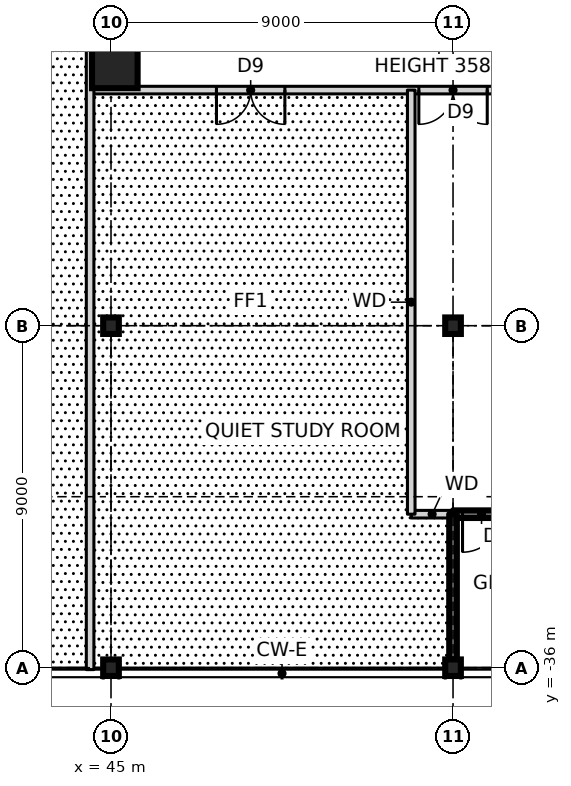
"""IFC4 building model, lengths in metres.
Left out: names, types, materials, properties, quantities, classifications, styles, units other than length and angle.
Written with IfcOpenShell. Run it as: python <this file> out.ifc"""

import sys

from ifc_helpers import new_model, si_unit, direction, frame, frame_2d, origin, origin_2d, place, context, subcontext, project, spatial, rectangle, hollow_rectangle, i_section, extrude, element, fill, save


model = new_model("IFC4")
c1 = context("Model", 3, precision=1e-05, world=origin(), true_north=direction((0.0, 1.0)))
c2 = subcontext(c1, "Body", "Model", "MODEL_VIEW")
j1 = project(units=[si_unit("LENGTHUNIT", "METRE"), si_unit("PLANEANGLEUNIT", "RADIAN")], contexts=[c1])
p1 = place(None, origin())
s1 = spatial("IfcSite", under=j1, at=p1, CompositionType="ELEMENT")
p2 = place(p1, origin())
s2 = spatial("IfcBuilding", under=s1, at=p2, CompositionType="ELEMENT")
p3 = place(p2, frame((0.0, 0.0, 10.5)))
s3 = spatial("IfcBuildingStorey", under=s2, at=p3, CompositionType="ELEMENT", Elevation=10.5)
p4 = place(p3, frame((45.1, -20.15, 0.0), z_axis=(0.0, 0.0, 1.0), x_axis=(1.0, 0.0, 0.0)))
e1 = element("IfcColumn", 1, at=p4, inside=s3, PredefinedType="COLUMN", context=c2, shape_type="SweptSolid", body=[
    extrude(hollow_rectangle(XDim=1.2, YDim=1.2, WallThickness=0.07, at=origin_2d()), origin(), (0.0, 0.0, 1.0), 4.5),
])
for number, where, z_axis, x_axis in (
    (2, (45.0, -36.0, 0.0), (0.0, 0.0, 1.0), (1.0, 0.0, 0.0)),
    (3, (45.0, -27.0, 0.0), (0.0, 0.0, 1.0), (1.0, 0.0, 0.0)),
    (4, (54.0, -36.0, 0.0), (0.0, 0.0, 1.0), (1.0, 0.0, 0.0)),
    (5, (54.0, -27.0, 0.0), (0.0, 0.0, 1.0), (1.0, 0.0, 0.0)),
):
    element("IfcColumn", number, at=place(p3, frame(where, z_axis=z_axis, x_axis=x_axis)), inside=s3, PredefinedType="COLUMN", context=c2, shape_type="SweptSolid", body=[
        extrude(i_section(OverallWidth=0.411, OverallDepth=0.434, WebThickness=0.036, FlangeThickness=0.057, at=origin_2d()), origin(), (0.0, 0.0, 1.0), 4.5),
    ])
p5 = place(p3, frame((52.9, -31.96, 0.0), z_axis=(0.0, 0.0, 1.0), x_axis=(1.0, 0.0, 0.0)))
e6 = element("IfcWall", 6, at=p5, inside=s3, PredefinedType="SOLIDWALL", context=c2, shape_type="SweptSolid", body=[
    extrude(rectangle(XDim=1.1, YDim=0.2, at=frame_2d((0.55, 0.0))), origin(), (0.0, 0.0, 1.0), 4.25),
])
p6 = place(p3, frame((54.0, -31.96, 0.0), z_axis=(0.0, 0.0, 1.0), x_axis=(1.0, 0.0, 0.0)))
e7 = element("IfcWall", 7, at=p6, inside=s3, PredefinedType="SOLIDWALL", context=c2, shape_type="SweptSolid", body=[
    extrude(rectangle(XDim=9.0, YDim=0.2, at=frame_2d((4.5, 0.0))), origin(), (0.0, 0.0, 1.0), 4.5),
])
p7 = place(p6, frame((0.25, 0.0, 0.0)))
e8 = element("IfcOpeningElement", 8, at=p7, cuts=e7, PredefinedType="OPENING", context=c2, shape_type="SweptSolid", body=[
    extrude(rectangle(XDim=1.0, YDim=2.1, at=frame_2d((0.5, 1.05))), frame((0.0, 0.11, 0.0), z_axis=(0.0, -1.0, 0.0), x_axis=(1.0, 0.0, 0.0)), (0.0, 0.0, 1.0), 0.22),
])
p8 = place(p3, frame((44.45, -20.8, 0.0), z_axis=(0.0, 0.0, 1.0), x_axis=(1.0, 0.0, 0.0)))
e9 = element("IfcWall", 9, at=p8, inside=s3, PredefinedType="SOLIDWALL", context=c2, shape_type="SweptSolid", body=[
    extrude(rectangle(XDim=37.1, YDim=0.2, at=frame_2d((18.55, 0.0))), origin(), (0.0, 0.0, 1.0), 4.25),
])
p9 = place(p8, frame((3.325, 0.0, 0.0)))
e10 = element("IfcOpeningElement", 10, at=p9, cuts=e9, PredefinedType="OPENING", context=c2, shape_type="SweptSolid", body=[
    extrude(rectangle(XDim=1.8, YDim=2.1, at=frame_2d((0.9, 1.05))), frame((0.0, 0.11, 0.0), z_axis=(0.0, -1.0, 0.0), x_axis=(1.0, 0.0, 0.0)), (0.0, 0.0, 1.0), 0.22),
])
p10 = place(p8, frame((26.625, 0.0, 0.0)))
e11 = element("IfcOpeningElement", 11, at=p10, cuts=e9, PredefinedType="OPENING", context=c2, shape_type="SweptSolid", body=[
    extrude(rectangle(XDim=1.8, YDim=2.1, at=frame_2d((0.9, 1.05))), frame((0.0, 0.11, 0.0), z_axis=(0.0, -1.0, 0.0), x_axis=(1.0, 0.0, 0.0)), (0.0, 0.0, 1.0), 0.22),
])
p11 = place(p8, frame((8.65, 0.0, 0.0)))
e12 = element("IfcOpeningElement", 12, at=p11, cuts=e9, PredefinedType="OPENING", context=c2, shape_type="SweptSolid", body=[
    extrude(rectangle(XDim=1.8, YDim=2.1, at=frame_2d((0.9, 1.05))), frame((0.0, 0.11, 0.0), z_axis=(0.0, -1.0, 0.0), x_axis=(1.0, 0.0, 0.0)), (0.0, 0.0, 1.0), 0.22),
])
p12 = place(p3, frame((54.0, -35.783, 0.0), z_axis=(0.0, 0.0, 1.0), x_axis=(0.0, 1.0, 0.0)))
e13 = element("IfcWall", 13, at=p12, inside=s3, PredefinedType="SOLIDWALL", context=c2, shape_type="SweptSolid", body=[
    extrude(rectangle(XDim=3.823, YDim=0.2, at=frame_2d((1.911, 0.0))), origin(), (0.0, 0.0, 1.0), 4.5),
])
p13 = place(p3, frame((52.9, -31.96, 0.0), z_axis=(0.0, 0.0, 1.0), x_axis=(0.0, 1.0, 0.0)))
e14 = element("IfcWall", 14, at=p13, inside=s3, PredefinedType="SOLIDWALL", context=c2, shape_type="SweptSolid", body=[
    extrude(rectangle(XDim=11.16, YDim=0.2, at=frame_2d((5.58, 0.0))), origin(), (0.0, 0.0, 1.0), 4.25),
])
p14 = place(p3, frame((44.45, -36.05, 0.0), z_axis=(0.0, 0.0, 1.0), x_axis=(0.0, 1.0, 0.0)))
e15 = element("IfcWall", 15, at=p14, inside=s3, PredefinedType="SOLIDWALL", context=c2, shape_type="SweptSolid", body=[
    extrude(rectangle(XDim=72.1, YDim=0.2, at=frame_2d((36.05, 0.0))), origin(), (0.0, 0.0, 1.0), 4.25),
])
p15 = place(p14, frame((24.75, 0.0, 0.0)))
e16 = element("IfcOpeningElement", 16, at=p15, cuts=e15, PredefinedType="OPENING", context=c2, shape_type="SweptSolid", body=[
    extrude(rectangle(XDim=1.8, YDim=2.1, at=frame_2d((0.9, 1.05))), frame((0.0, 0.11, 0.0), z_axis=(0.0, -1.0, 0.0), x_axis=(1.0, 0.0, 0.0)), (0.0, 0.0, 1.0), 0.22),
])
p16 = place(p14, frame((45.55, 0.0, 0.0)))
e17 = element("IfcOpeningElement", 17, at=p16, cuts=e15, PredefinedType="OPENING", context=c2, shape_type="SweptSolid", body=[
    extrude(rectangle(XDim=1.8, YDim=2.1, at=frame_2d((0.9, 1.05))), frame((0.0, 0.11, 0.0), z_axis=(0.0, -1.0, 0.0), x_axis=(1.0, 0.0, 0.0)), (0.0, 0.0, 1.0), 0.22),
])
p17 = place(p9, frame((1.8, 0.0, 0.0), z_axis=(0.0, 0.0, 1.0), x_axis=(-1.0, 0.0, 0.0)))
e18 = element("IfcDoor", 18, at=p17, inside=s3, OperationType="DOUBLE_DOOR_SINGLE_SWING", PredefinedType="DOOR", context=c2, shape_type="SweptSolid", body=[
    extrude(rectangle(XDim=1.8, YDim=2.1, at=frame_2d((0.9, 1.05))), frame((0.0, 0.025, 0.0), z_axis=(0.0, -1.0, 0.0), x_axis=(1.0, 0.0, 0.0)), (0.0, 0.0, 1.0), 0.05),
])
fill(e10, e18)
p18 = place(p11, frame((1.8, 0.0, 0.0), z_axis=(0.0, 0.0, 1.0), x_axis=(-1.0, 0.0, 0.0)))
e19 = element("IfcDoor", 19, at=p18, inside=s3, OperationType="DOUBLE_DOOR_SINGLE_SWING", PredefinedType="DOOR", context=c2, shape_type="SweptSolid", body=[
    extrude(rectangle(XDim=1.8, YDim=2.1, at=frame_2d((0.9, 1.05))), frame((0.0, 0.025, 0.0), z_axis=(0.0, -1.0, 0.0), x_axis=(1.0, 0.0, 0.0)), (0.0, 0.0, 1.0), 0.05),
])
fill(e12, e19)
p19 = place(p7, frame((1.0, 0.0, 0.0), z_axis=(0.0, 0.0, 1.0), x_axis=(-1.0, 0.0, 0.0)))
e20 = element("IfcDoor", 20, at=p19, inside=s3, OperationType="SINGLE_SWING_RIGHT", PredefinedType="DOOR", context=c2, shape_type="SweptSolid", body=[
    extrude(rectangle(XDim=1.0, YDim=2.1, at=frame_2d((0.5, 1.05))), frame((0.0, 0.025, 0.0), z_axis=(0.0, -1.0, 0.0), x_axis=(1.0, 0.0, 0.0)), (0.0, 0.0, 1.0), 0.05),
])
fill(e8, e20)
save(model, sys.argv[1])
